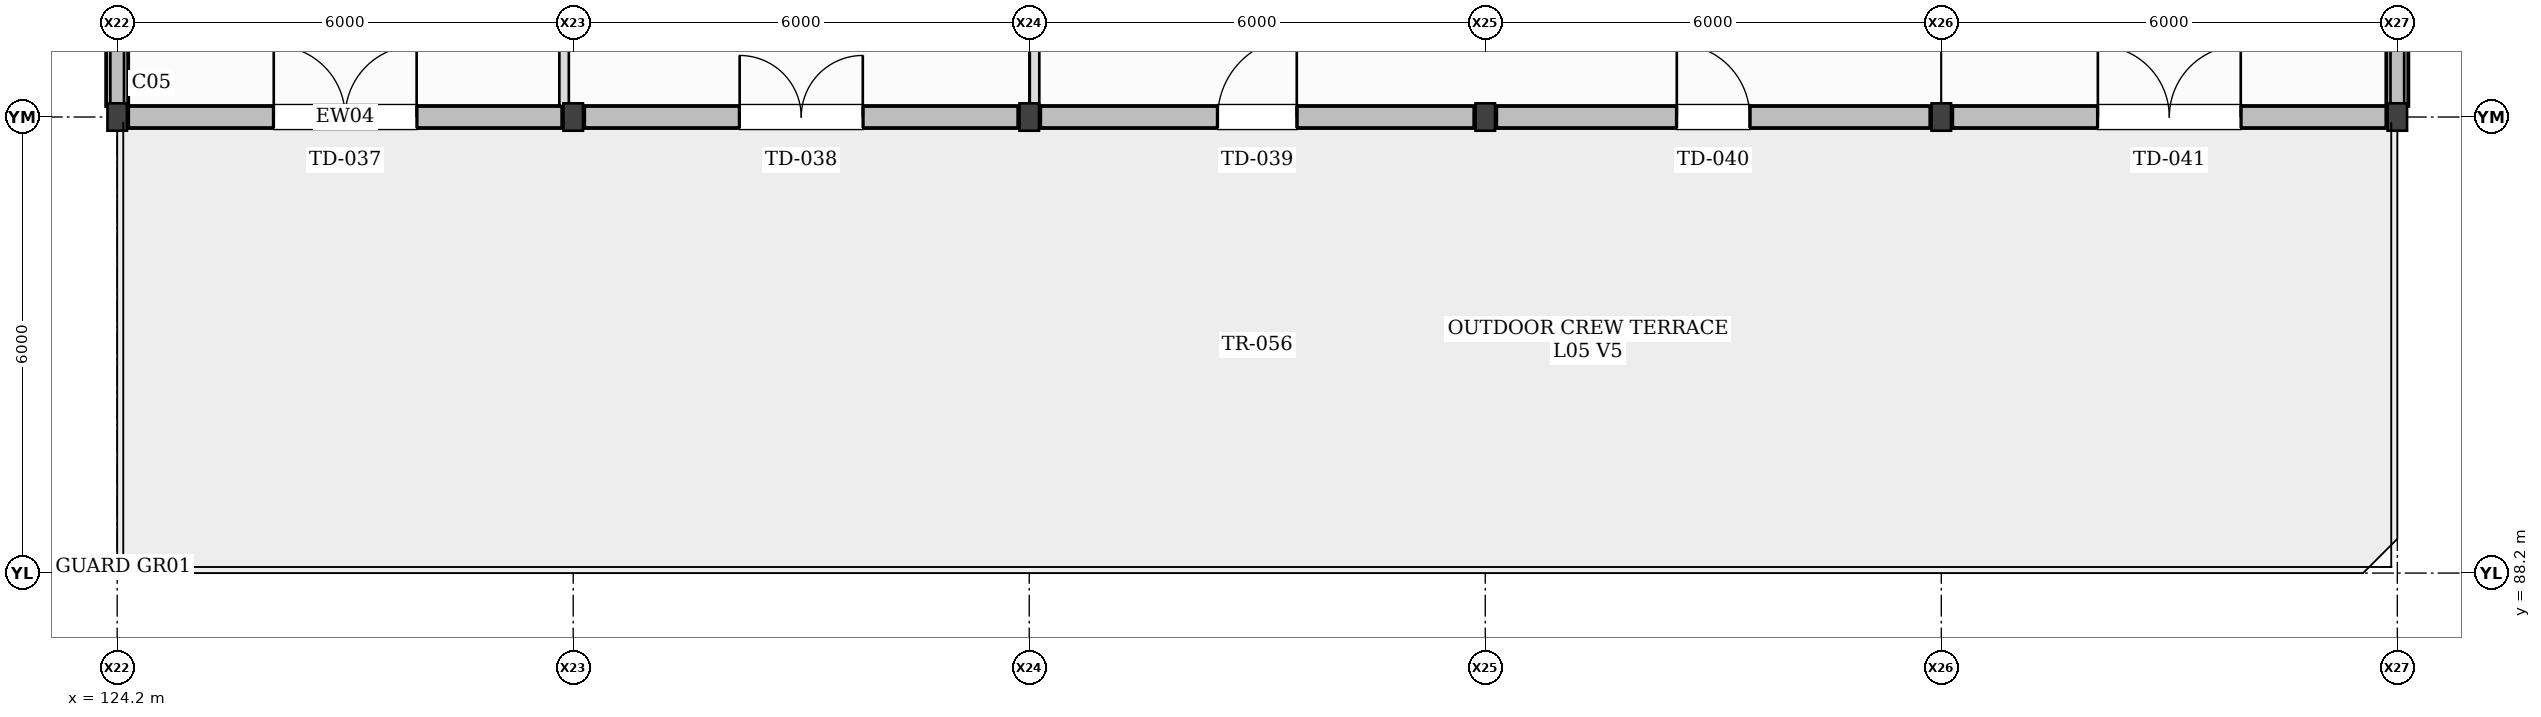
"""IFC4 building model, lengths in metres.
Left out: names, types, materials, properties, quantities, classifications, styles, units other than length and angle.
Written with IfcOpenShell. Run it as: python <this file> out.ifc"""

import sys

from ifc_helpers import new_model, si_unit, direction, frame, frame_2d, origin, origin_2d, place, context, subcontext, project, spatial, rectangle, i_section, extrude, element, fill, save


model = new_model("IFC4")
c1 = context("Model", 3, precision=1e-05, world=origin(), true_north=direction((0.0, 1.0)))
c2 = subcontext(c1, "Body", "Model", "MODEL_VIEW")
j1 = project(units=[si_unit("LENGTHUNIT", "METRE"), si_unit("PLANEANGLEUNIT", "RADIAN")], contexts=[c1])
p1 = place(None, origin())
s1 = spatial("IfcSite", under=j1, at=p1, CompositionType="ELEMENT")
p2 = place(p1, origin())
s2 = spatial("IfcBuilding", under=s1, at=p2, CompositionType="ELEMENT")
p3 = place(p2, frame((0.0, 0.0, 18.0)))
s3 = spatial("IfcBuildingStorey", under=s2, at=p3, CompositionType="ELEMENT", Elevation=18.0)
for number, where, z_axis, x_axis in (
    (1, (124.2, 94.2, 0.0), (0.0, 0.0, 1.0), (1.0, 0.0, 0.0)),
    (2, (130.2, 94.2, 0.0), (0.0, 0.0, 1.0), (1.0, 0.0, 0.0)),
    (3, (136.2, 94.2, 0.0), (0.0, 0.0, 1.0), (1.0, 0.0, 0.0)),
    (4, (142.2, 94.2, 0.0), (0.0, 0.0, 1.0), (1.0, 0.0, 0.0)),
    (5, (148.2, 94.2, 0.0), (0.0, 0.0, 1.0), (1.0, 0.0, 0.0)),
    (6, (154.2, 94.2, 0.0), (0.0, 0.0, 1.0), (1.0, 0.0, 0.0)),
):
    element("IfcColumn", number, at=place(p3, frame(where, z_axis=z_axis, x_axis=x_axis)), inside=s3, PredefinedType="COLUMN", context=c2, shape_type="SweptSolid", body=[
        extrude(i_section(OverallWidth=0.256, OverallDepth=0.36, WebThickness=0.011, FlangeThickness=0.02, at=origin_2d()), origin(), (0.0, 0.0, 1.0), 3.6),
    ])
p4 = place(p3, frame((124.345, 94.2, 0.0), z_axis=(0.0, 0.0, 1.0), x_axis=(1.0, 0.0, 0.0)))
e7 = element("IfcWall", 7, at=p4, inside=s3, PredefinedType="STANDARD", context=c2, shape_type="SweptSolid", body=[
    extrude(rectangle(XDim=5.71, YDim=0.29, at=frame_2d((2.855, 0.0))), origin(), (0.0, 0.0, 1.0), 3.6),
])
p5 = place(p4, frame((1.915, 0.0, 0.0)))
e8 = element("IfcOpeningElement", 8, at=p5, cuts=e7, PredefinedType="OPENING", context=c2, shape_type="SweptSolid", body=[
    extrude(rectangle(XDim=1.88, YDim=2.28, at=frame_2d((0.94, 1.14))), frame((0.0, 0.155, 0.0), z_axis=(0.0, -1.0, 0.0), x_axis=(1.0, 0.0, 0.0)), (0.0, 0.0, 1.0), 0.31),
])
p6 = place(p3, frame((130.345, 94.2, 0.0), z_axis=(0.0, 0.0, 1.0), x_axis=(1.0, 0.0, 0.0)))
e9 = element("IfcWall", 9, at=p6, inside=s3, PredefinedType="STANDARD", context=c2, shape_type="SweptSolid", body=[
    extrude(rectangle(XDim=5.71, YDim=0.29, at=frame_2d((2.855, 0.0))), origin(), (0.0, 0.0, 1.0), 3.6),
])
p7 = place(p6, frame((2.045, 0.0, 0.0)))
e10 = element("IfcOpeningElement", 10, at=p7, cuts=e9, PredefinedType="OPENING", context=c2, shape_type="SweptSolid", body=[
    extrude(rectangle(XDim=1.62, YDim=2.2, at=frame_2d((0.81, 1.1))), frame((0.0, 0.155, 0.0), z_axis=(0.0, -1.0, 0.0), x_axis=(1.0, 0.0, 0.0)), (0.0, 0.0, 1.0), 0.31),
])
p8 = place(p3, frame((136.345, 94.2, 0.0), z_axis=(0.0, 0.0, 1.0), x_axis=(1.0, 0.0, 0.0)))
e11 = element("IfcWall", 11, at=p8, inside=s3, PredefinedType="STANDARD", context=c2, shape_type="SweptSolid", body=[
    extrude(rectangle(XDim=5.71, YDim=0.29, at=frame_2d((2.855, 0.0))), origin(), (0.0, 0.0, 1.0), 3.6),
])
p9 = place(p8, frame((2.335, 0.0, 0.0)))
e12 = element("IfcOpeningElement", 12, at=p9, cuts=e11, PredefinedType="OPENING", context=c2, shape_type="SweptSolid", body=[
    extrude(rectangle(XDim=1.04, YDim=2.16, at=frame_2d((0.52, 1.08))), frame((0.0, 0.155, 0.0), z_axis=(0.0, -1.0, 0.0), x_axis=(1.0, 0.0, 0.0)), (0.0, 0.0, 1.0), 0.31),
])
p10 = place(p3, frame((142.345, 94.2, 0.0), z_axis=(0.0, 0.0, 1.0), x_axis=(1.0, 0.0, 0.0)))
e13 = element("IfcWall", 13, at=p10, inside=s3, PredefinedType="STANDARD", context=c2, shape_type="SweptSolid", body=[
    extrude(rectangle(XDim=5.71, YDim=0.29, at=frame_2d((2.855, 0.0))), origin(), (0.0, 0.0, 1.0), 3.219),
])
p11 = place(p10, frame((2.375, 0.0, 0.0)))
e14 = element("IfcOpeningElement", 14, at=p11, cuts=e13, PredefinedType="OPENING", context=c2, shape_type="SweptSolid", body=[
    extrude(rectangle(XDim=0.96, YDim=2.14, at=frame_2d((0.48, 1.07))), frame((0.0, 0.155, 0.0), z_axis=(0.0, -1.0, 0.0), x_axis=(1.0, 0.0, 0.0)), (0.0, 0.0, 1.0), 0.31),
])
p12 = place(p3, frame((148.345, 94.2, 0.0), z_axis=(0.0, 0.0, 1.0), x_axis=(1.0, 0.0, 0.0)))
e15 = element("IfcWall", 15, at=p12, inside=s3, PredefinedType="STANDARD", context=c2, shape_type="SweptSolid", body=[
    extrude(rectangle(XDim=5.71, YDim=0.29, at=frame_2d((2.855, 0.0))), origin(), (0.0, 0.0, 1.0), 3.219),
])
p13 = place(p12, frame((1.915, 0.0, 0.0)))
e16 = element("IfcOpeningElement", 16, at=p13, cuts=e15, PredefinedType="OPENING", context=c2, shape_type="SweptSolid", body=[
    extrude(rectangle(XDim=1.88, YDim=2.28, at=frame_2d((0.94, 1.14))), frame((0.0, 0.155, 0.0), z_axis=(0.0, -1.0, 0.0), x_axis=(1.0, 0.0, 0.0)), (0.0, 0.0, 1.0), 0.31),
])
p14 = place(p3, frame((124.2, 100.055, 0.0), z_axis=(0.0, 0.0, 1.0), x_axis=(0.0, -1.0, 0.0)))
e17 = element("IfcWall", 17, at=p14, inside=s3, PredefinedType="STANDARD", context=c2, shape_type="SweptSolid", body=[
    extrude(rectangle(XDim=5.71, YDim=0.29, at=frame_2d((2.855, 0.0))), origin(), (0.0, 0.0, 1.0), 0.92),
])
p15 = place(p3, frame((154.2, 94.345, 0.0), z_axis=(0.0, 0.0, 1.0), x_axis=(0.0, 1.0, 0.0)))
e18 = element("IfcWall", 18, at=p15, inside=s3, PredefinedType="STANDARD", context=c2, shape_type="SweptSolid", body=[
    extrude(rectangle(XDim=5.71, YDim=0.29, at=frame_2d((2.855, 0.0))), origin(), (0.0, 0.0, 1.0), 0.44),
])
p16 = place(p3, frame((136.27, 94.345, 0.0), z_axis=(0.0, 0.0, 1.0), x_axis=(0.0, 1.0, 0.0)))
e19 = element("IfcWall", 19, at=p16, inside=s3, PredefinedType="PARTITIONING", context=c2, shape_type="SweptSolid", body=[
    extrude(rectangle(XDim=3.498, YDim=0.125, at=frame_2d((1.749, 0.0))), origin(), (0.0, 0.0, 1.0), 3.36),
])
p17 = place(p3, frame((130.08, 97.778, 0.0), z_axis=(0.0, 0.0, 1.0), x_axis=(0.0, -1.0, 0.0)))
e20 = element("IfcWall", 20, at=p17, inside=s3, PredefinedType="PARTITIONING", context=c2, shape_type="SweptSolid", body=[
    extrude(rectangle(XDim=3.433, YDim=0.125, at=frame_2d((1.716, 0.0))), origin(), (0.0, 0.0, 1.0), 3.36),
])
p18 = place(p5, frame((1.88, 0.0, 0.0), z_axis=(0.0, 0.0, 1.0), x_axis=(-1.0, 0.0, 0.0)))
e21 = element("IfcDoor", 21, at=p18, inside=s3, OperationType="DOUBLE_DOOR_SINGLE_SWING", PredefinedType="DOOR", context=c2, shape_type="SweptSolid", body=[
    extrude(rectangle(XDim=1.88, YDim=2.28, at=frame_2d((0.94, 1.14))), frame((0.0, 0.025, 0.0), z_axis=(0.0, -1.0, 0.0), x_axis=(1.0, 0.0, 0.0)), (0.0, 0.0, 1.0), 0.05),
])
fill(e8, e21)
p19 = place(p7, frame((1.62, 0.0, 0.0), z_axis=(0.0, 0.0, 1.0), x_axis=(-1.0, 0.0, 0.0)))
e22 = element("IfcDoor", 22, at=p19, inside=s3, OperationType="DOUBLE_DOOR_SINGLE_SWING", PredefinedType="DOOR", context=c2, shape_type="SweptSolid", body=[
    extrude(rectangle(XDim=1.62, YDim=2.2, at=frame_2d((0.81, 1.1))), frame((0.0, 0.025, 0.0), z_axis=(0.0, -1.0, 0.0), x_axis=(1.0, 0.0, 0.0)), (0.0, 0.0, 1.0), 0.05),
])
fill(e10, e22)
p20 = place(p9, frame((1.04, 0.0, 0.0), z_axis=(0.0, 0.0, 1.0), x_axis=(-1.0, 0.0, 0.0)))
e23 = element("IfcDoor", 23, at=p20, inside=s3, OperationType="SINGLE_SWING_RIGHT", PredefinedType="DOOR", context=c2, shape_type="SweptSolid", body=[
    extrude(rectangle(XDim=1.04, YDim=2.16, at=frame_2d((0.52, 1.08))), frame((0.0, 0.025, 0.0), z_axis=(0.0, -1.0, 0.0), x_axis=(1.0, 0.0, 0.0)), (0.0, 0.0, 1.0), 0.05),
])
fill(e12, e23)
p21 = place(p11, frame((0.96, 0.0, 0.0), z_axis=(0.0, 0.0, 1.0), x_axis=(-1.0, 0.0, 0.0)))
e24 = element("IfcDoor", 24, at=p21, inside=s3, OperationType="SINGLE_SWING_LEFT", PredefinedType="DOOR", context=c2, shape_type="SweptSolid", body=[
    extrude(rectangle(XDim=0.96, YDim=2.14, at=frame_2d((0.48, 1.07))), frame((0.0, 0.025, 0.0), z_axis=(0.0, -1.0, 0.0), x_axis=(1.0, 0.0, 0.0)), (0.0, 0.0, 1.0), 0.05),
])
fill(e14, e24)
p22 = place(p13, frame((1.88, 0.0, 0.0), z_axis=(0.0, 0.0, 1.0), x_axis=(-1.0, 0.0, 0.0)))
e25 = element("IfcDoor", 25, at=p22, inside=s3, OperationType="DOUBLE_DOOR_SINGLE_SWING", PredefinedType="DOOR", context=c2, shape_type="SweptSolid", body=[
    extrude(rectangle(XDim=1.88, YDim=2.28, at=frame_2d((0.94, 1.14))), frame((0.0, 0.025, 0.0), z_axis=(0.0, -1.0, 0.0), x_axis=(1.0, 0.0, 0.0)), (0.0, 0.0, 1.0), 0.05),
])
fill(e16, e25)
save(model, sys.argv[1])
